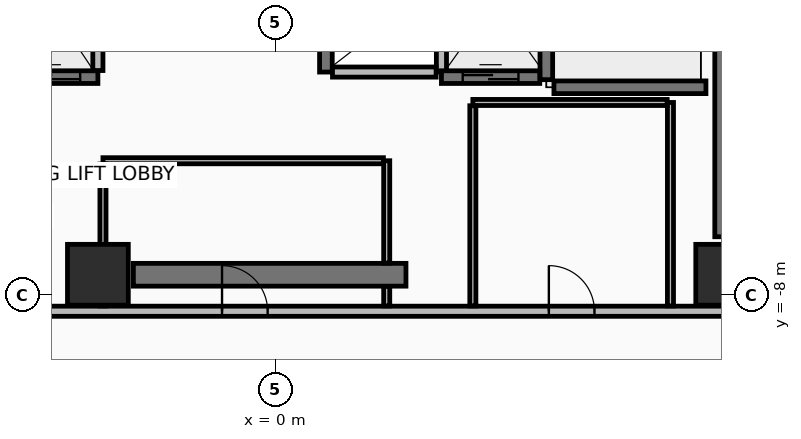
"""IFC4 building model, lengths in metres.
Left out: names, types, materials, properties, quantities, classifications, styles, units other than length and angle.
Written with IfcOpenShell. Run it as: python <this file> out.ifc"""

import sys

from ifc_helpers import new_model, si_unit, direction, frame, frame_2d, origin, origin_2d, place, context, subcontext, project, spatial, rectangle, extrude, element, fill, save


model = new_model("IFC4")
c1 = context("Model", 3, precision=1e-05, world=origin(), true_north=direction((0.0, 1.0)))
c2 = subcontext(c1, "Body", "Model", "MODEL_VIEW")
j1 = project(units=[si_unit("LENGTHUNIT", "METRE"), si_unit("PLANEANGLEUNIT", "RADIAN")], contexts=[c1])
p1 = place(None, origin())
s1 = spatial("IfcSite", under=j1, at=p1, CompositionType="ELEMENT")
p2 = place(p1, origin())
s2 = spatial("IfcBuilding", under=s1, at=p2, CompositionType="ELEMENT")
p3 = place(p2, frame((0.0, 0.0, 123.25)))
s3 = spatial("IfcBuildingStorey", under=s2, at=p3, CompositionType="ELEMENT", Elevation=123.25)
for number, where, z_axis, x_axis in (
    (1, (-3.5, -7.6, 0.0), (0.0, 0.0, 1.0), (1.0, 0.0, 0.0)),
    (2, (8.9, -7.6, 0.0), (0.0, 0.0, 1.0), (1.0, 0.0, 0.0)),
):
    element("IfcColumn", number, at=place(p3, frame(where, z_axis=z_axis, x_axis=x_axis)), inside=s3, PredefinedType="COLUMN", context=c2, shape_type="SweptSolid", body=[
        extrude(rectangle(XDim=1.2, YDim=1.2, at=origin_2d()), origin(), (0.0, 0.0, 1.0), 3.6),
    ])
p4 = place(p3, frame((-2.8, -7.6, 0.0), z_axis=(0.0, 0.0, 1.0), x_axis=(1.0, 0.0, 0.0)))
e3 = element("IfcWall", 3, at=p4, inside=s3, PredefinedType="SHEAR", context=c2, shape_type="SweptSolid", body=[
    extrude(rectangle(XDim=5.38, YDim=0.45, at=frame_2d((2.69, 0.0))), origin(), (0.0, 0.0, 1.0), 3.41),
])
p5 = place(p3, frame((8.9, -6.85, 0.0), z_axis=(0.0, 0.0, 1.0), x_axis=(0.0, 1.0, 0.0)))
e4 = element("IfcWall", 4, at=p5, inside=s3, PredefinedType="SHEAR", context=c2, shape_type="SweptSolid", body=[
    extrude(rectangle(XDim=10.7, YDim=0.45, at=frame_2d((5.35, 0.0))), origin(), (0.0, 0.0, 1.0), 3.41),
])
p6 = place(p3, frame((-9.62, -8.32, 0.0), z_axis=(0.0, 0.0, 1.0), x_axis=(1.0, 0.0, 0.0)))
e5 = element("IfcWall", 5, at=p6, inside=s3, PredefinedType="PARTITIONING", context=c2, shape_type="SweptSolid", body=[
    extrude(rectangle(XDim=19.24, YDim=0.2, at=frame_2d((9.62, 0.0))), origin(), (0.0, 0.0, 1.0), 2.855),
])
p7 = place(p6, frame((8.57, 0.0, 0.0)))
e6 = element("IfcOpeningElement", 6, at=p7, cuts=e5, PredefinedType="OPENING", context=c2, shape_type="SweptSolid", body=[
    extrude(rectangle(XDim=0.9, YDim=2.1, at=frame_2d((0.45, 1.05))), frame((0.0, 0.11, 0.0), z_axis=(0.0, -1.0, 0.0), x_axis=(1.0, 0.0, 0.0)), (0.0, 0.0, 1.0), 0.22),
])
p8 = place(p6, frame((15.02, 0.0, 0.0)))
e7 = element("IfcOpeningElement", 7, at=p8, cuts=e5, PredefinedType="OPENING", context=c2, shape_type="SweptSolid", body=[
    extrude(rectangle(XDim=0.9, YDim=2.1, at=frame_2d((0.45, 1.05))), frame((0.0, 0.11, 0.0), z_axis=(0.0, -1.0, 0.0), x_axis=(1.0, 0.0, 0.0)), (0.0, 0.0, 1.0), 0.22),
])
p9 = place(p3, frame((5.35, -3.75, 0.0), z_axis=(0.0, 0.0, 1.0), x_axis=(0.0, 1.0, 0.0)))
e8 = element("IfcWall", 8, at=p9, inside=s3, PredefinedType="SHEAR", context=c2, shape_type="SweptSolid", body=[
    extrude(rectangle(XDim=7.3, YDim=0.25, at=frame_2d((3.65, 0.0))), origin(), (0.0, 0.0, 1.0), 3.41),
])
p10 = place(p3, frame((5.5, -3.9, 0.0), z_axis=(0.0, 0.0, 1.0), x_axis=(1.0, 0.0, 0.0)))
e9 = element("IfcWall", 9, at=p10, inside=s3, PredefinedType="SHEAR", context=c2, shape_type="SweptSolid", body=[
    extrude(rectangle(XDim=3.0, YDim=0.25, at=frame_2d((1.5, 0.0))), origin(), (0.0, 0.0, 1.0), 3.41),
])
p11 = place(p3, frame((1.0, -3.6, 0.0), z_axis=(0.0, 0.0, 1.0), x_axis=(0.0, 1.0, 0.0)))
e10 = element("IfcWall", 10, at=p11, inside=s3, PredefinedType="SHEAR", context=c2, shape_type="SweptSolid", body=[
    extrude(rectangle(XDim=1.8, YDim=0.25, at=frame_2d((0.9, 0.0))), origin(), (0.0, 0.0, 1.0), 3.41),
])
p12 = place(p3, frame((3.28, -3.6, 0.0), z_axis=(0.0, 0.0, 1.0), x_axis=(0.0, 1.0, 0.0)))
e11 = element("IfcWall", 11, at=p12, inside=s3, PredefinedType="PARTITIONING", context=c2, shape_type="SweptSolid", body=[
    extrude(rectangle(XDim=1.8, YDim=0.2, at=frame_2d((0.9, 0.0))), origin(), (0.0, 0.0, 1.0), 3.41),
])
p13 = place(p3, frame((1.13, -3.6, 0.0), z_axis=(0.0, 0.0, 1.0), x_axis=(1.0, 0.0, 0.0)))
e12 = element("IfcWall", 12, at=p13, inside=s3, PredefinedType="PARTITIONING", context=c2, shape_type="SweptSolid", body=[
    extrude(rectangle(XDim=2.045, YDim=0.2, at=frame_2d((1.022, 0.0))), origin(), (0.0, 0.0, 1.0), 3.41),
])
p14 = place(p3, frame((-5.4, -3.7, 0.0), z_axis=(0.0, 0.0, 1.0), x_axis=(1.0, 0.0, 0.0)))
e13 = element("IfcWall", 13, at=p14, inside=s3, PredefinedType="SHEAR", context=c2, shape_type="SweptSolid", body=[
    extrude(rectangle(XDim=1.9, YDim=0.25, at=frame_2d((0.95, 0.0))), origin(), (0.0, 0.0, 1.0), 3.41),
])
p15 = place(p14, frame((0.35, 0.0, 0.0)))
e14 = element("IfcOpeningElement", 14, at=p15, cuts=e13, PredefinedType="OPENING", context=c2, shape_type="SweptSolid", body=[
    extrude(rectangle(XDim=1.2, YDim=2.2, at=frame_2d((0.6, 1.1))), frame((0.0, 0.135, 0.0), z_axis=(0.0, -1.0, 0.0), x_axis=(1.0, 0.0, 0.0)), (0.0, 0.0, 1.0), 0.27),
])
p16 = place(p3, frame((-3.5, -3.57, 0.0), z_axis=(0.0, 0.0, 1.0), x_axis=(0.0, 1.0, 0.0)))
e15 = element("IfcWall", 15, at=p16, inside=s3, PredefinedType="PARTITIONING", context=c2, shape_type="SweptSolid", body=[
    extrude(rectangle(XDim=2.615, YDim=0.2, at=frame_2d((1.308, 0.0))), origin(), (0.0, 0.0, 1.0), 3.41),
])
p17 = place(p3, frame((3.28, -3.7, 0.0), z_axis=(0.0, 0.0, 1.0), x_axis=(1.0, 0.0, 0.0)))
e16 = element("IfcWall", 16, at=p17, inside=s3, PredefinedType="SHEAR", context=c2, shape_type="SweptSolid", body=[
    extrude(rectangle(XDim=1.94, YDim=0.25, at=frame_2d((0.97, 0.0))), origin(), (0.0, 0.0, 1.0), 3.41),
])
p18 = place(p17, frame((0.42, 0.0, 0.0)))
e17 = element("IfcOpeningElement", 17, at=p18, cuts=e16, PredefinedType="OPENING", context=c2, shape_type="SweptSolid", body=[
    extrude(rectangle(XDim=1.1, YDim=2.2, at=frame_2d((0.55, 1.1))), frame((0.0, 0.135, 0.0), z_axis=(0.0, -1.0, 0.0), x_axis=(1.0, 0.0, 0.0)), (0.0, 0.0, 1.0), 0.27),
])
p19 = place(p3, frame((2.2, -8.215, 0.0), z_axis=(0.0, 0.0, 1.0), x_axis=(0.0, 1.0, 0.0)))
e18 = element("IfcWall", 18, at=p19, inside=s3, PredefinedType="PARTITIONING", context=c2, shape_type="SweptSolid", body=[
    extrude(rectangle(XDim=0.385, YDim=0.12, at=frame_2d((0.192, 0.0))), origin(), (0.0, 0.0, 1.0), 2.605),
])
p20 = place(p3, frame((2.2, -7.37, 0.0), z_axis=(0.0, 0.0, 1.0), x_axis=(0.0, 1.0, 0.0)))
e19 = element("IfcWall", 19, at=p20, inside=s3, PredefinedType="PARTITIONING", context=c2, shape_type="SweptSolid", body=[
    extrude(rectangle(XDim=2.02, YDim=0.12, at=frame_2d((1.01, 0.0))), origin(), (0.0, 0.0, 1.0), 2.605),
])
p21 = place(p3, frame((2.135, -5.35, 0.0), z_axis=(0.0, 0.0, 1.0), x_axis=(-1.0, 0.0, 0.0)))
e20 = element("IfcWall", 20, at=p21, inside=s3, PredefinedType="PARTITIONING", context=c2, shape_type="SweptSolid", body=[
    extrude(rectangle(XDim=5.535, YDim=0.12, at=frame_2d((2.768, 0.0))), origin(), (0.0, 0.0, 1.0), 2.605),
])
p22 = place(p3, frame((-3.4, -5.415, 0.0), z_axis=(0.0, 0.0, 1.0), x_axis=(0.0, -1.0, 0.0)))
e21 = element("IfcWall", 21, at=p22, inside=s3, PredefinedType="PARTITIONING", context=c2, shape_type="SweptSolid", body=[
    extrude(rectangle(XDim=2.8, YDim=0.12, at=frame_2d((1.4, 0.0))), origin(), (0.0, 0.0, 1.0), 2.605),
])
p23 = place(p3, frame((7.8, -8.215, 0.0), z_axis=(0.0, 0.0, 1.0), x_axis=(0.0, 1.0, 0.0)))
e22 = element("IfcWall", 22, at=p23, inside=s3, PredefinedType="PARTITIONING", context=c2, shape_type="SweptSolid", body=[
    extrude(rectangle(XDim=4.015, YDim=0.12, at=frame_2d((2.008, 0.0))), origin(), (0.0, 0.0, 1.0), 2.605),
])
p24 = place(p3, frame((7.735, -4.2, 0.0), z_axis=(0.0, 0.0, 1.0), x_axis=(-1.0, 0.0, 0.0)))
e23 = element("IfcWall", 23, at=p24, inside=s3, PredefinedType="PARTITIONING", context=c2, shape_type="SweptSolid", body=[
    extrude(rectangle(XDim=3.835, YDim=0.12, at=frame_2d((1.917, 0.0))), origin(), (0.0, 0.0, 1.0), 3.41),
])
p25 = place(p3, frame((3.9, -4.265, 0.0), z_axis=(0.0, 0.0, 1.0), x_axis=(0.0, -1.0, 0.0)))
e24 = element("IfcWall", 24, at=p25, inside=s3, PredefinedType="PARTITIONING", context=c2, shape_type="SweptSolid", body=[
    extrude(rectangle(XDim=3.95, YDim=0.12, at=frame_2d((1.975, 0.0))), origin(), (0.0, 0.0, 1.0), 2.605),
])
p26 = place(p15, origin())
e25 = element("IfcDoor", 25, at=p26, inside=s3, OperationType="SLIDING_TO_RIGHT", PredefinedType="DOOR", context=c2, shape_type="SweptSolid", body=[
    extrude(rectangle(XDim=1.2, YDim=2.2, at=frame_2d((0.6, 1.1))), frame((0.0, 0.025, 0.0), z_axis=(0.0, -1.0, 0.0), x_axis=(1.0, 0.0, 0.0)), (0.0, 0.0, 1.0), 0.05),
])
fill(e14, e25)
p27 = place(p18, origin())
e26 = element("IfcDoor", 26, at=p27, inside=s3, OperationType="SLIDING_TO_LEFT", PredefinedType="DOOR", context=c2, shape_type="SweptSolid", body=[
    extrude(rectangle(XDim=1.1, YDim=2.2, at=frame_2d((0.55, 1.1))), frame((0.0, 0.025, 0.0), z_axis=(0.0, -1.0, 0.0), x_axis=(1.0, 0.0, 0.0)), (0.0, 0.0, 1.0), 0.05),
])
fill(e17, e26)
p28 = place(p7, origin())
e27 = element("IfcDoor", 27, at=p28, inside=s3, OperationType="SINGLE_SWING_LEFT", PredefinedType="DOOR", context=c2, shape_type="SweptSolid", body=[
    extrude(rectangle(XDim=0.9, YDim=2.1, at=frame_2d((0.45, 1.05))), frame((0.0, 0.025, 0.0), z_axis=(0.0, -1.0, 0.0), x_axis=(1.0, 0.0, 0.0)), (0.0, 0.0, 1.0), 0.05),
])
fill(e6, e27)
p29 = place(p8, origin())
e28 = element("IfcDoor", 28, at=p29, inside=s3, OperationType="SINGLE_SWING_LEFT", PredefinedType="DOOR", context=c2, shape_type="SweptSolid", body=[
    extrude(rectangle(XDim=0.9, YDim=2.1, at=frame_2d((0.45, 1.05))), frame((0.0, 0.025, 0.0), z_axis=(0.0, -1.0, 0.0), x_axis=(1.0, 0.0, 0.0)), (0.0, 0.0, 1.0), 0.05),
])
fill(e7, e28)
save(model, sys.argv[1])
